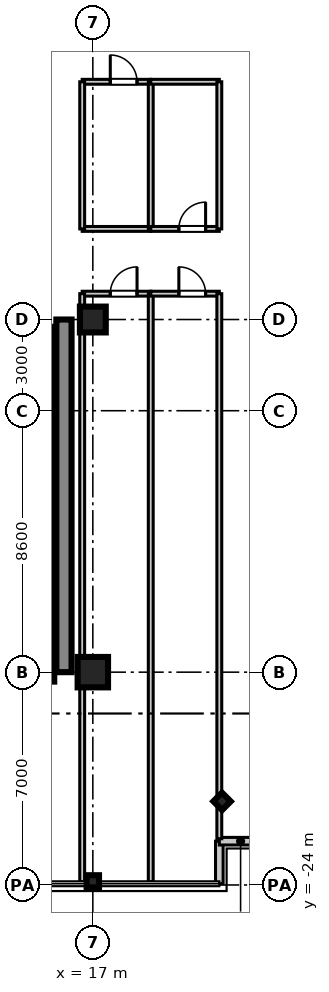
"""IFC4 building model, lengths in metres.
Left out: names, types, materials, properties, quantities, classifications, styles, units other than length and angle.
Written with IfcOpenShell. Run it as: python <this file> out.ifc"""

import sys

from ifc_helpers import new_model, si_unit, direction, frame, frame_2d, origin, origin_2d, place, context, subcontext, project, spatial, rectangle, i_section, extrude, source, transform, mapped, element, fill, save


model = new_model("IFC4")
c1 = context("Model", 3, precision=1e-05, world=origin(), true_north=direction((0.0, 1.0)))
c2 = subcontext(c1, "Body", "Model", "MODEL_VIEW")
j1 = project(units=[si_unit("LENGTHUNIT", "METRE"), si_unit("PLANEANGLEUNIT", "RADIAN")], contexts=[c1])
p1 = place(None, origin())
s1 = spatial("IfcSite", under=j1, at=p1, CompositionType="ELEMENT")
p2 = place(p1, origin())
s2 = spatial("IfcBuilding", under=s1, at=p2, CompositionType="ELEMENT")
p3 = place(p2, frame((0.0, 0.0, 204.9)))
s3 = spatial("IfcBuildingStorey", under=s2, at=p3, CompositionType="ELEMENT", Elevation=204.9)
m1 = source(origin(), c2, "Body", "SweptSolid", [
    extrude(rectangle(XDim=1.0, YDim=1.0, at=origin_2d()), origin(), (0.0, 0.0, 1.0), 3.655),
])
p4 = place(p3, frame((17.0, -17.0, 0.0), z_axis=(0.0, 0.0, 1.0), x_axis=(1.0, 0.0, 0.0)))
e1 = element("IfcColumn", 1, at=p4, inside=s3, PredefinedType="COLUMN", context=c2, shape_type="MappedRepresentation", body=[
    mapped(m1, transform((0.0, 0.0, 0.0), scale=1.0)),
])
m2 = source(origin(), c2, "Body", "SweptSolid", [
    extrude(rectangle(XDim=0.85, YDim=0.85, at=origin_2d()), origin(), (0.0, 0.0, 1.0), 3.655),
])
p5 = place(p3, frame((17.0, -5.4, 0.0), z_axis=(0.0, 0.0, 1.0), x_axis=(1.0, 0.0, 0.0)))
e2 = element("IfcColumn", 2, at=p5, inside=s3, PredefinedType="PILASTER", context=c2, shape_type="MappedRepresentation", body=[
    mapped(m2, transform((0.0, 0.0, 0.0), scale=1.0)),
])
m3 = source(origin(), c2, "Body", "SweptSolid", [
    extrude(i_section(OverallWidth=0.401, OverallDepth=0.406, WebThickness=0.016, FlangeThickness=0.025, at=origin_2d()), origin(), (0.0, 0.0, 1.0), 3.655),
])
for number, where, z_axis, x_axis in (
    (3, (17.0, -23.88, 0.0), (0.0, 0.0, 1.0), (0.0, 1.0, 0.0)),
    (4, (21.25, -21.25, 0.0), (0.0, 0.0, 1.0), (0.707, 0.707, 0.0)),
):
    element("IfcColumn", number, at=place(p3, frame(where, z_axis=z_axis, x_axis=x_axis)), inside=s3, PredefinedType="COLUMN", context=c2, shape_type="MappedRepresentation", body=[
        mapped(m3, transform((0.0, 0.0, 0.0), scale=1.0)),
    ])
m4 = source(origin(), c2, "Body", "SweptSolid", [
    extrude(rectangle(XDim=11.6, YDim=0.5, at=frame_2d((5.8, 0.0))), origin(), (0.0, 0.0, 1.0), 3.41),
])
p6 = place(p3, frame((16.05, -17.0, 0.0), z_axis=(0.0, 0.0, 1.0), x_axis=(0.0, 1.0, 0.0)))
e5 = element("IfcWall", 5, at=p6, inside=s3, PredefinedType="SHEAR", context=c2, shape_type="MappedRepresentation", body=[
    mapped(m4, transform((0.0, 0.0, 0.0), scale=1.0)),
])
m5 = source(origin(), c2, "Body", "SweptSolid", [
    extrude(rectangle(XDim=2.36, YDim=0.22, at=frame_2d((1.18, 0.0))), origin(), (0.0, 0.0, 1.0), 3.41),
])
p7 = place(p3, frame((15.62, -8.0, 0.0), z_axis=(0.0, 0.0, 1.0), x_axis=(0.0, 1.0, 0.0)))
e6 = element("IfcWall", 6, at=p7, inside=s3, PredefinedType="SHEAR", context=c2, shape_type="MappedRepresentation", body=[
    mapped(m5, transform((0.0, 0.0, 0.0), scale=1.0)),
])
m6 = source(origin(), c2, "Body", "SweptSolid", [
    extrude(rectangle(XDim=2.2, YDim=0.22, at=frame_2d((1.1, 0.0))), origin(), (0.0, 0.0, 1.0), 3.41),
])
for number, where, z_axis, x_axis in (
    (7, (15.62, -10.2, 0.0), (0.0, 0.0, 1.0), (0.0, 1.0, 0.0)),
    (8, (15.62, -12.4, 0.0), (0.0, 0.0, 1.0), (0.0, 1.0, 0.0)),
):
    element("IfcWall", number, at=place(p3, frame(where, z_axis=z_axis, x_axis=x_axis)), inside=s3, PredefinedType="SHEAR", context=c2, shape_type="MappedRepresentation", body=[
        mapped(m6, transform((0.0, 0.0, 0.0), scale=1.0)),
    ])
m7 = source(origin(), c2, "Body", "SweptSolid", [
    extrude(rectangle(XDim=2.3, YDim=0.22, at=frame_2d((1.15, 0.0))), origin(), (0.0, 0.0, 1.0), 3.41),
])
p8 = place(p3, frame((15.62, -14.7, 0.0), z_axis=(0.0, 0.0, 1.0), x_axis=(0.0, 1.0, 0.0)))
e9 = element("IfcWall", 9, at=p8, inside=s3, PredefinedType="SHEAR", context=c2, shape_type="MappedRepresentation", body=[
    mapped(m7, transform((0.0, 0.0, 0.0), scale=1.0)),
])
m8 = source(origin(), c2, "Body", "SweptSolid", [
    extrude(rectangle(XDim=2.61, YDim=0.22, at=frame_2d((1.305, 0.0))), origin(), (0.0, 0.0, 1.0), 3.41),
])
p9 = place(p3, frame((15.62, -17.31, 0.0), z_axis=(0.0, 0.0, 1.0), x_axis=(0.0, 1.0, 0.0)))
e10 = element("IfcWall", 10, at=p9, inside=s3, PredefinedType="SHEAR", context=c2, shape_type="MappedRepresentation", body=[
    mapped(m8, transform((0.0, 0.0, 0.0), scale=1.0)),
])
m9 = source(origin(), c2, "Body", "SweptSolid", [
    extrude(rectangle(XDim=1.4, YDim=0.25, at=frame_2d((0.7, 0.0))), origin(), (0.0, 0.0, 1.0), 3.41),
])
p10 = place(p3, frame((21.16, -23.96, 0.0), z_axis=(0.0, 0.0, 1.0), x_axis=(0.0, 1.0, 0.0)))
e11 = element("IfcWall", 11, at=p10, inside=s3, PredefinedType="STANDARD", context=c2, shape_type="MappedRepresentation", body=[
    mapped(m9, transform((0.0, 0.0, 0.0), scale=1.0)),
])
m10 = source(origin(), c2, "Body", "SweptSolid", [
    extrude(rectangle(XDim=1.4, YDim=0.25, at=frame_2d((0.7, 0.0))), origin(), (0.0, 0.0, 1.0), 3.41),
])
p11 = place(p3, frame((21.16, -22.56, 0.0), z_axis=(0.0, 0.0, 1.0), x_axis=(1.0, 0.0, 0.0)))
e12 = element("IfcWall", 12, at=p11, inside=s3, PredefinedType="STANDARD", context=c2, shape_type="MappedRepresentation", body=[
    mapped(m10, transform((0.0, 0.0, 0.0), scale=1.0)),
])
m11 = source(origin(), c2, "Body", "SweptSolid", [
    extrude(rectangle(XDim=2.255, YDim=0.16, at=frame_2d((1.127, 0.0))), origin(), (0.0, 0.0, 1.0), 2.75),
])
p12 = place(p3, frame((16.65, -4.55, 0.0), z_axis=(0.0, 0.0, 1.0), x_axis=(1.0, 0.0, 0.0)))
e13 = element("IfcWall", 13, at=p12, inside=s3, PredefinedType="PARTITIONING", context=c2, shape_type="MappedRepresentation", body=[
    mapped(m11, transform((0.0, 0.0, 0.0), scale=1.0)),
])
p13 = place(p12, frame((0.924, 0.0, 0.0)))
e14 = element("IfcOpeningElement", 14, at=p13, cuts=e13, PredefinedType="OPENING", context=c2, shape_type="SweptSolid", body=[
    extrude(rectangle(XDim=0.88, YDim=2.1, at=frame_2d((0.44, 1.05))), frame((0.0, 0.09, 0.0), z_axis=(0.0, -1.0, 0.0), x_axis=(1.0, 0.0, 0.0)), (0.0, 0.0, 1.0), 0.18),
])
m12 = source(origin(), c2, "Body", "SweptSolid", [
    extrude(rectangle(XDim=19.35, YDim=0.16, at=frame_2d((9.675, 0.0))), origin(), (0.0, 0.0, 1.0), 2.75),
])
for number, where, z_axis, x_axis in (
    (15, (16.65, -23.9, 0.0), (0.0, 0.0, 1.0), (0.0, 1.0, 0.0)),
    (16, (18.905, -23.9, 0.0), (0.0, 0.0, 1.0), (0.0, 1.0, 0.0)),
):
    element("IfcWall", number, at=place(p3, frame(where, z_axis=z_axis, x_axis=x_axis)), inside=s3, PredefinedType="PARTITIONING", context=c2, shape_type="MappedRepresentation", body=[
        mapped(m12, transform((0.0, 0.0, 0.0), scale=1.0)),
    ])
m13 = source(origin(), c2, "Body", "SweptSolid", [
    extrude(rectangle(XDim=2.255, YDim=0.16, at=frame_2d((1.127, 0.0))), origin(), (0.0, 0.0, 1.0), 2.75),
])
p14 = place(p3, frame((18.905, -4.55, 0.0), z_axis=(0.0, 0.0, 1.0), x_axis=(1.0, 0.0, 0.0)))
e17 = element("IfcWall", 17, at=p14, inside=s3, PredefinedType="PARTITIONING", context=c2, shape_type="MappedRepresentation", body=[
    mapped(m13, transform((0.0, 0.0, 0.0), scale=1.0)),
])
p15 = place(p14, frame((0.924, 0.0, 0.0)))
e18 = element("IfcOpeningElement", 18, at=p15, cuts=e17, PredefinedType="OPENING", context=c2, shape_type="SweptSolid", body=[
    extrude(rectangle(XDim=0.88, YDim=2.1, at=frame_2d((0.44, 1.05))), frame((0.0, 0.09, 0.0), z_axis=(0.0, -1.0, 0.0), x_axis=(1.0, 0.0, 0.0)), (0.0, 0.0, 1.0), 0.18),
])
m14 = source(origin(), c2, "Body", "SweptSolid", [
    extrude(rectangle(XDim=17.93, YDim=0.16, at=frame_2d((8.965, 0.0))), origin(), (0.0, 0.0, 1.0), 2.75),
])
p16 = place(p3, frame((21.16, -22.48, 0.0), z_axis=(0.0, 0.0, 1.0), x_axis=(0.0, 1.0, 0.0)))
e19 = element("IfcWall", 19, at=p16, inside=s3, PredefinedType="PARTITIONING", context=c2, shape_type="MappedRepresentation", body=[
    mapped(m14, transform((0.0, 0.0, 0.0), scale=1.0)),
])
p17 = place(p3, frame((16.65, -2.42, 0.0), z_axis=(0.0, 0.0, 1.0), x_axis=(1.0, 0.0, 0.0)))
e20 = element("IfcWall", 20, at=p17, inside=s3, PredefinedType="PARTITIONING", context=c2, shape_type="MappedRepresentation", body=[
    mapped(m11, transform((0.0, 0.0, 0.0), scale=1.0)),
])
p18 = place(p3, frame((16.65, 2.42, 0.0), z_axis=(0.0, 0.0, 1.0), x_axis=(1.0, 0.0, 0.0)))
e21 = element("IfcWall", 21, at=p18, inside=s3, PredefinedType="PARTITIONING", context=c2, shape_type="MappedRepresentation", body=[
    mapped(m11, transform((0.0, 0.0, 0.0), scale=1.0)),
])
p19 = place(p18, frame((0.924, 0.0, 0.0)))
e22 = element("IfcOpeningElement", 22, at=p19, cuts=e21, PredefinedType="OPENING", context=c2, shape_type="SweptSolid", body=[
    extrude(rectangle(XDim=0.88, YDim=2.1, at=frame_2d((0.44, 1.05))), frame((0.0, 0.09, 0.0), z_axis=(0.0, -1.0, 0.0), x_axis=(1.0, 0.0, 0.0)), (0.0, 0.0, 1.0), 0.18),
])
m15 = source(origin(), c2, "Body", "SweptSolid", [
    extrude(rectangle(XDim=4.84, YDim=0.16, at=frame_2d((2.42, 0.0))), origin(), (0.0, 0.0, 1.0), 2.75),
])
for number, where, z_axis, x_axis in (
    (23, (16.65, -2.42, 0.0), (0.0, 0.0, 1.0), (0.0, 1.0, 0.0)),
    (24, (18.905, -2.42, 0.0), (0.0, 0.0, 1.0), (0.0, 1.0, 0.0)),
):
    element("IfcWall", number, at=place(p3, frame(where, z_axis=z_axis, x_axis=x_axis)), inside=s3, PredefinedType="PARTITIONING", context=c2, shape_type="MappedRepresentation", body=[
        mapped(m15, transform((0.0, 0.0, 0.0), scale=1.0)),
    ])
p20 = place(p3, frame((18.905, -2.42, 0.0), z_axis=(0.0, 0.0, 1.0), x_axis=(1.0, 0.0, 0.0)))
e25 = element("IfcWall", 25, at=p20, inside=s3, PredefinedType="PARTITIONING", context=c2, shape_type="MappedRepresentation", body=[
    mapped(m13, transform((0.0, 0.0, 0.0), scale=1.0)),
])
p21 = place(p20, frame((0.924, 0.0, 0.0)))
e26 = element("IfcOpeningElement", 26, at=p21, cuts=e25, PredefinedType="OPENING", context=c2, shape_type="SweptSolid", body=[
    extrude(rectangle(XDim=0.88, YDim=2.1, at=frame_2d((0.44, 1.05))), frame((0.0, 0.09, 0.0), z_axis=(0.0, -1.0, 0.0), x_axis=(1.0, 0.0, 0.0)), (0.0, 0.0, 1.0), 0.18),
])
p22 = place(p3, frame((18.905, 2.42, 0.0), z_axis=(0.0, 0.0, 1.0), x_axis=(1.0, 0.0, 0.0)))
e27 = element("IfcWall", 27, at=p22, inside=s3, PredefinedType="PARTITIONING", context=c2, shape_type="MappedRepresentation", body=[
    mapped(m13, transform((0.0, 0.0, 0.0), scale=1.0)),
])
p23 = place(p3, frame((21.16, -2.42, 0.0), z_axis=(0.0, 0.0, 1.0), x_axis=(0.0, 1.0, 0.0)))
e28 = element("IfcWall", 28, at=p23, inside=s3, PredefinedType="PARTITIONING", context=c2, shape_type="MappedRepresentation", body=[
    mapped(m15, transform((0.0, 0.0, 0.0), scale=1.0)),
])
m16 = source(origin(), c2, "Body", "SweptSolid", [
    extrude(rectangle(XDim=0.88, YDim=2.1, at=frame_2d((0.44, 1.05))), frame((0.0, 0.025, 0.0), z_axis=(0.0, -1.0, 0.0), x_axis=(1.0, 0.0, 0.0)), (0.0, 0.0, 1.0), 0.05),
])
p24 = place(p13, frame((0.88, 0.0, 0.0), z_axis=(0.0, 0.0, 1.0), x_axis=(-1.0, 0.0, 0.0)))
e29 = element("IfcDoor", 29, at=p24, inside=s3, OperationType="SINGLE_SWING_RIGHT", PredefinedType="DOOR", context=c2, shape_type="MappedRepresentation", body=[
    mapped(m16, transform((0.0, 0.0, 0.0), scale=1.0)),
])
fill(e14, e29)
p25 = place(p15, frame((0.88, 0.0, 0.0), z_axis=(0.0, 0.0, 1.0), x_axis=(-1.0, 0.0, 0.0)))
e30 = element("IfcDoor", 30, at=p25, inside=s3, OperationType="SINGLE_SWING_LEFT", PredefinedType="DOOR", context=c2, shape_type="MappedRepresentation", body=[
    mapped(m16, transform((0.0, 0.0, 0.0), scale=1.0)),
])
fill(e18, e30)
p26 = place(p19, frame((0.88, 0.0, 0.0), z_axis=(0.0, 0.0, 1.0), x_axis=(-1.0, 0.0, 0.0)))
e31 = element("IfcDoor", 31, at=p26, inside=s3, OperationType="SINGLE_SWING_LEFT", PredefinedType="DOOR", context=c2, shape_type="MappedRepresentation", body=[
    mapped(m16, transform((0.0, 0.0, 0.0), scale=1.0)),
])
fill(e22, e31)
p27 = place(p21, origin())
e32 = element("IfcDoor", 32, at=p27, inside=s3, OperationType="SINGLE_SWING_RIGHT", PredefinedType="DOOR", context=c2, shape_type="MappedRepresentation", body=[
    mapped(m16, transform((0.0, 0.0, 0.0), scale=1.0)),
])
fill(e26, e32)
save(model, sys.argv[1])
